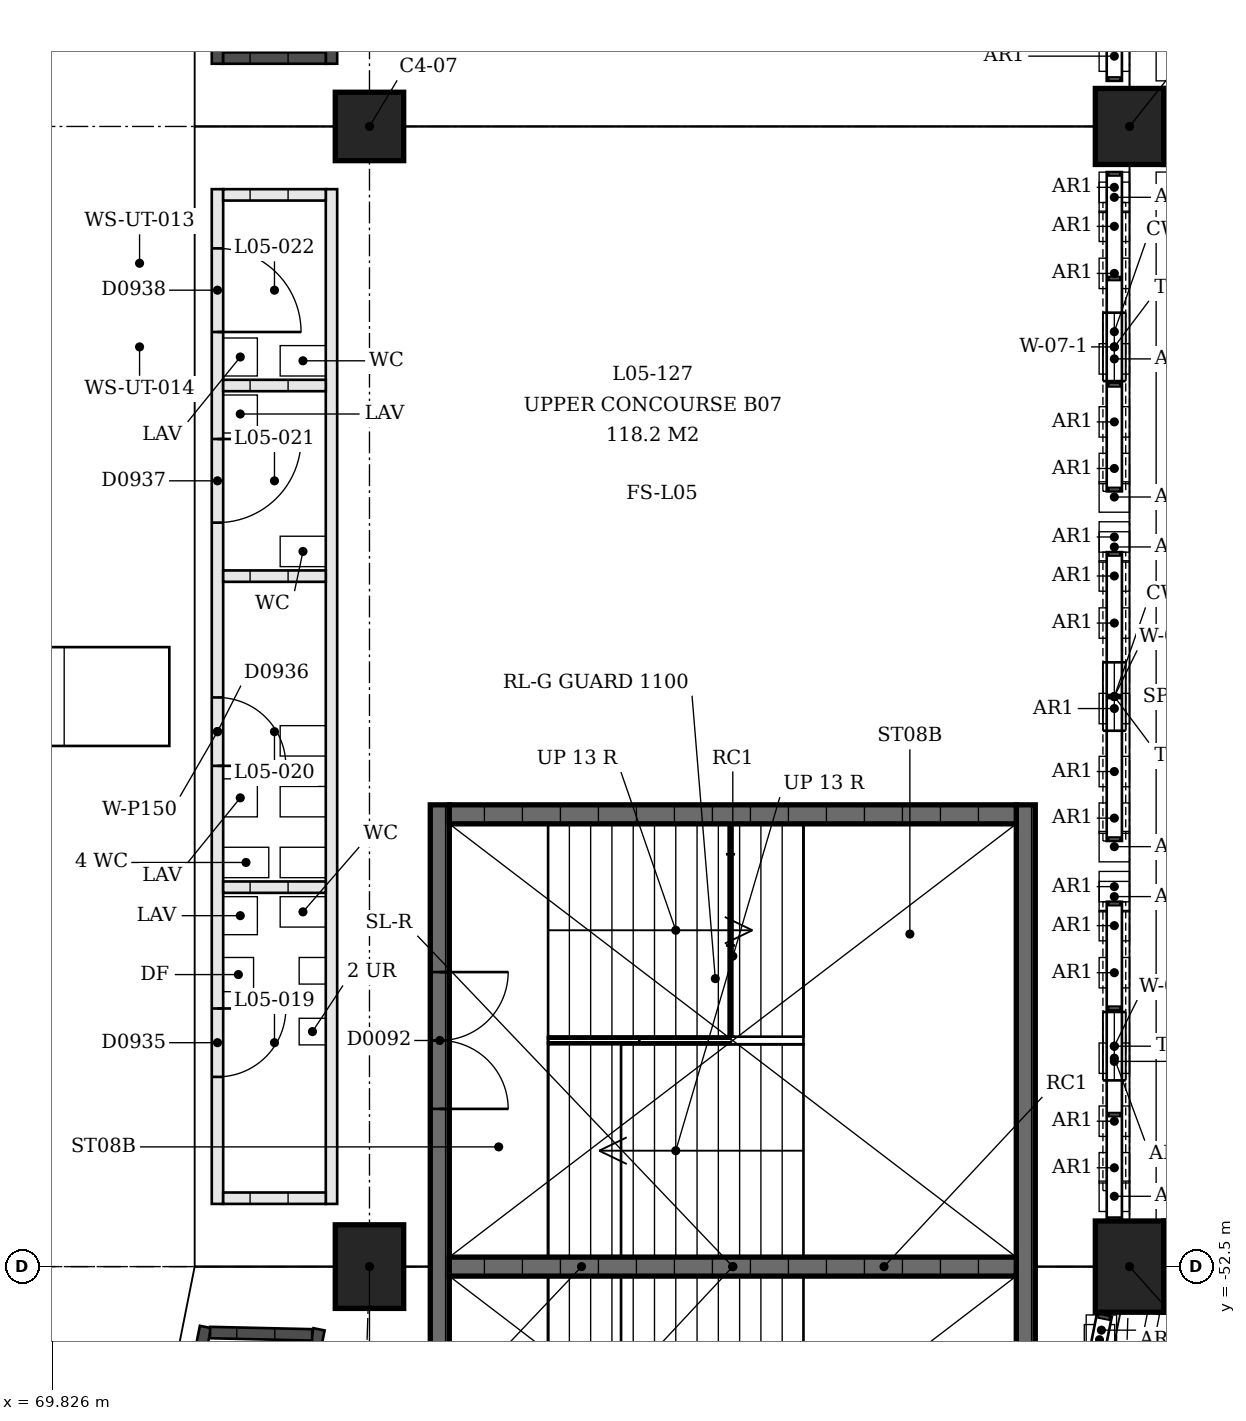
"""IFC4 building model, lengths in metres.
Left out: names, types, materials, properties, quantities, classifications, styles, units other than length and angle.
Written with IfcOpenShell. Run it as: python <this file> out.ifc"""

import sys

from ifc_helpers import new_model, si_unit, direction, frame, frame_2d, origin, origin_2d, place, context, subcontext, project, spatial, polyline, rectangle, outline, extrude, element, fill, save


model = new_model("IFC4")
c1 = context("Model", 3, precision=1e-05, world=origin(), true_north=direction((0.0, 1.0)))
c2 = subcontext(c1, "Body", "Model", "MODEL_VIEW")
j1 = project(units=[si_unit("LENGTHUNIT", "METRE"), si_unit("PLANEANGLEUNIT", "RADIAN")], contexts=[c1])
p1 = place(None, origin())
s1 = spatial("IfcSite", under=j1, at=p1, CompositionType="ELEMENT")
p2 = place(p1, origin())
s2 = spatial("IfcBuilding", under=s1, at=p2, CompositionType="ELEMENT")
p3 = place(p2, frame((0.0, 0.0, 22.5)))
s3 = spatial("IfcBuildingStorey", under=s2, at=p3, CompositionType="ELEMENT", Elevation=22.5)
p4 = place(p3, frame((74.0, -37.5, 0.0), z_axis=(0.0, 0.0, 1.0), x_axis=(0.0, 1.0, 0.0)))
e1 = element("IfcColumn", 1, at=p4, inside=s3, PredefinedType="COLUMN", context=c2, shape_type="SweptSolid", body=[
    extrude(rectangle(XDim=0.9, YDim=0.9, at=origin_2d()), origin(), (0.0, 0.0, 1.0), 6.5),
])
p5 = place(p3, frame((84.0, -37.5, 0.0), z_axis=(0.0, 0.0, 1.0), x_axis=(0.0, 1.0, 0.0)))
e2 = element("IfcColumn", 2, at=p5, inside=s3, PredefinedType="COLUMN", context=c2, shape_type="SweptSolid", body=[
    extrude(rectangle(XDim=1.0, YDim=0.9, at=origin_2d()), origin(), (0.0, 0.0, 1.0), 6.5),
])
p6 = place(p3, frame((74.0, -52.5, 0.0), z_axis=(0.0, 0.0, 1.0), x_axis=(0.0, 1.0, 0.0)))
e3 = element("IfcColumn", 3, at=p6, inside=s3, PredefinedType="COLUMN", context=c2, shape_type="SweptSolid", body=[
    extrude(rectangle(XDim=1.1, YDim=0.9, at=origin_2d()), origin(), (0.0, 0.0, 1.0), 6.5),
])
p7 = place(p3, frame((84.0, -52.5, 0.0), z_axis=(0.0, 0.0, 1.0), x_axis=(0.0, 1.0, 0.0)))
e4 = element("IfcColumn", 4, at=p7, inside=s3, PredefinedType="COLUMN", context=c2, shape_type="SweptSolid", body=[
    extrude(rectangle(XDim=1.2, YDim=0.9, at=origin_2d()), origin(), (0.0, 0.0, 1.0), 6.5),
])
p8 = place(p3, frame((83.8, -38.5, 4.1), z_axis=(0.0, 0.0, 1.0), x_axis=(0.0, -1.0, 0.0)))
e5 = element("IfcWall", 5, at=p8, inside=s3, PredefinedType="SOLIDWALL", context=c2, shape_type="SweptSolid", body=[
    extrude(outline(polyline([(0.0, 0.0), (3.8, 0.0), (3.8, 0.05), (3.676, 1.314), (3.308, 2.581), (2.709, 3.757), (1.9, 4.8), (1.091, 3.757), (0.492, 2.581), (0.124, 1.314), (0.0, 0.05), (0.0, 0.0)])), frame((0.0, 0.15, 0.0), z_axis=(0.0, -1.0, 0.0), x_axis=(1.0, 0.0, 0.0)), (0.0, 0.0, 1.0), 0.3),
])
p9 = place(p8, frame((1.45, 0.0, 0.4)))
e6 = element("IfcOpeningElement", 6, at=p9, cuts=e5, PredefinedType="OPENING", context=c2, shape_type="SweptSolid", body=[
    extrude(rectangle(XDim=0.9, YDim=3.6, at=frame_2d((0.45, 1.8))), frame((0.0, 0.16, 0.0), z_axis=(0.0, -1.0, 0.0), x_axis=(1.0, 0.0, 0.0)), (0.0, 0.0, 1.0), 0.32),
])
p10 = place(p3, frame((83.8, -43.1, 4.1), z_axis=(0.0, 0.0, 1.0), x_axis=(0.0, -1.0, 0.0)))
e7 = element("IfcWall", 7, at=p10, inside=s3, PredefinedType="SOLIDWALL", context=c2, shape_type="SweptSolid", body=[
    extrude(outline(polyline([(0.0, 0.0), (3.8, 0.0), (3.8, 0.05), (3.676, 1.314), (3.308, 2.581), (2.709, 3.757), (1.9, 4.8), (1.091, 3.757), (0.492, 2.581), (0.124, 1.314), (0.0, 0.05), (0.0, 0.0)])), frame((0.0, 0.15, 0.0), z_axis=(0.0, -1.0, 0.0), x_axis=(1.0, 0.0, 0.0)), (0.0, 0.0, 1.0), 0.3),
])
p11 = place(p10, frame((1.45, 0.0, 0.4)))
e8 = element("IfcOpeningElement", 8, at=p11, cuts=e7, PredefinedType="OPENING", context=c2, shape_type="SweptSolid", body=[
    extrude(rectangle(XDim=0.9, YDim=3.6, at=frame_2d((0.45, 1.8))), frame((0.0, 0.16, 0.0), z_axis=(0.0, -1.0, 0.0), x_axis=(1.0, 0.0, 0.0)), (0.0, 0.0, 1.0), 0.32),
])
p12 = place(p3, frame((83.8, -47.7, 4.1), z_axis=(0.0, 0.0, 1.0), x_axis=(0.0, -1.0, 0.0)))
e9 = element("IfcWall", 9, at=p12, inside=s3, PredefinedType="SOLIDWALL", context=c2, shape_type="SweptSolid", body=[
    extrude(outline(polyline([(0.0, 0.0), (3.8, 0.0), (3.8, 0.05), (3.676, 1.314), (3.308, 2.581), (2.709, 3.757), (1.9, 4.8), (1.091, 3.757), (0.492, 2.581), (0.124, 1.314), (0.0, 0.05), (0.0, 0.0)])), frame((0.0, 0.15, 0.0), z_axis=(0.0, -1.0, 0.0), x_axis=(1.0, 0.0, 0.0)), (0.0, 0.0, 1.0), 0.3),
])
p13 = place(p12, frame((1.45, 0.0, 0.4)))
e10 = element("IfcOpeningElement", 10, at=p13, cuts=e9, PredefinedType="OPENING", context=c2, shape_type="SweptSolid", body=[
    extrude(rectangle(XDim=0.9, YDim=3.6, at=frame_2d((0.45, 1.8))), frame((0.0, 0.16, 0.0), z_axis=(0.0, -1.0, 0.0), x_axis=(1.0, 0.0, 0.0)), (0.0, 0.0, 1.0), 0.32),
])
p14 = place(p3, frame((74.925, -58.575, 0.0), z_axis=(0.0, 0.0, 1.0), x_axis=(0.0, 1.0, 0.0)))
e11 = element("IfcWall", 11, at=p14, inside=s3, PredefinedType="SHEAR", context=c2, shape_type="SweptSolid", body=[
    extrude(rectangle(XDim=12.15, YDim=0.25, at=frame_2d((6.075, 0.0))), origin(), (0.0, 0.0, 1.0), 2.1),
])
p15 = place(p14, frame((2.2, 0.0, 0.0)))
e12 = element("IfcOpeningElement", 12, at=p15, cuts=e11, PredefinedType="OPENING", context=c2, shape_type="SweptSolid", body=[
    extrude(rectangle(XDim=1.8, YDim=2.1, at=frame_2d((0.9, 1.05))), frame((0.0, 0.125, 0.0), z_axis=(0.0, -1.0, 0.0), x_axis=(1.0, 0.0, 0.0)), (0.0, 0.0, 1.0), 0.25),
])
p16 = place(p14, frame((8.15, 0.0, 0.0)))
e13 = element("IfcOpeningElement", 13, at=p16, cuts=e11, PredefinedType="OPENING", context=c2, shape_type="SweptSolid", body=[
    extrude(rectangle(XDim=1.8, YDim=2.1, at=frame_2d((0.9, 1.05))), frame((0.0, 0.125, 0.0), z_axis=(0.0, -1.0, 0.0), x_axis=(1.0, 0.0, 0.0)), (0.0, 0.0, 1.0), 0.25),
])
p17 = place(p3, frame((82.635, -58.575, 0.0), z_axis=(0.0, 0.0, 1.0), x_axis=(0.0, 1.0, 0.0)))
e14 = element("IfcWall", 14, at=p17, inside=s3, PredefinedType="SHEAR", context=c2, shape_type="SweptSolid", body=[
    extrude(rectangle(XDim=12.15, YDim=0.25, at=frame_2d((6.075, 0.0))), origin(), (0.0, 0.0, 1.0), 2.1),
])
for number, where, z_axis, x_axis in (
    (15, (75.05, -46.55, 0.0), (0.0, 0.0, 1.0), (1.0, 0.0, 0.0)),
    (16, (75.05, -52.5, 0.0), (0.0, 0.0, 1.0), (1.0, 0.0, 0.0)),
):
    element("IfcWall", number, at=place(p3, frame(where, z_axis=z_axis, x_axis=x_axis)), inside=s3, PredefinedType="SHEAR", context=c2, shape_type="SweptSolid", body=[
        extrude(rectangle(XDim=7.46, YDim=0.25, at=frame_2d((3.73, 0.0))), origin(), (0.0, 0.0, 1.0), 2.1),
    ])
p18 = place(p3, frame((72.0, -23.325, 0.0), z_axis=(0.0, 0.0, 1.0), x_axis=(0.0, -1.0, 0.0)))
e17 = element("IfcWall", 17, at=p18, inside=s3, PredefinedType="SOLIDWALL", context=c2, shape_type="SweptSolid", body=[
    extrude(rectangle(XDim=13.35, YDim=0.15, at=frame_2d((6.675, 0.0))), origin(), (0.0, 0.0, 1.0), 3.0),
])
p19 = place(p18, frame((2.875, 0.0, 0.0)))
e18 = element("IfcOpeningElement", 18, at=p19, cuts=e17, PredefinedType="OPENING", context=c2, shape_type="SweptSolid", body=[
    extrude(rectangle(XDim=1.0, YDim=2.1, at=frame_2d((0.5, 1.05))), frame((0.0, 0.075, 0.0), z_axis=(0.0, -1.0, 0.0), x_axis=(1.0, 0.0, 0.0)), (0.0, 0.0, 1.0), 0.15),
])
p20 = place(p18, frame((9.475, 0.0, 0.0)))
e19 = element("IfcOpeningElement", 19, at=p20, cuts=e17, PredefinedType="OPENING", context=c2, shape_type="SweptSolid", body=[
    extrude(rectangle(XDim=1.0, YDim=2.1, at=frame_2d((0.5, 1.05))), frame((0.0, 0.075, 0.0), z_axis=(0.0, -1.0, 0.0), x_axis=(1.0, 0.0, 0.0)), (0.0, 0.0, 1.0), 0.15),
])
p21 = place(p3, frame((73.5, -23.325, 0.0), z_axis=(0.0, 0.0, 1.0), x_axis=(0.0, -1.0, 0.0)))
e20 = element("IfcWall", 20, at=p21, inside=s3, PredefinedType="SOLIDWALL", context=c2, shape_type="SweptSolid", body=[
    extrude(rectangle(XDim=13.35, YDim=0.15, at=frame_2d((6.675, 0.0))), origin(), (0.0, 0.0, 1.0), 3.0),
])
p22 = place(p3, frame((72.075, -36.6, 0.0), z_axis=(0.0, 0.0, 1.0), x_axis=(1.0, 0.0, 0.0)))
e21 = element("IfcWall", 21, at=p22, inside=s3, PredefinedType="SOLIDWALL", context=c2, shape_type="SweptSolid", body=[
    extrude(rectangle(XDim=1.35, YDim=0.15, at=frame_2d((0.675, 0.0))), origin(), (0.0, 0.0, 1.0), 3.0),
])
p23 = place(p3, frame((72.0, -51.675, 0.0), z_axis=(0.0, 0.0, 1.0), x_axis=(0.0, 1.0, 0.0)))
e22 = element("IfcWall", 22, at=p23, inside=s3, PredefinedType="PARTITIONING", context=c2, shape_type="SweptSolid", body=[
    extrude(rectangle(XDim=13.35, YDim=0.15, at=frame_2d((6.675, 0.0))), origin(), (0.0, 0.0, 1.0), 3.0),
])
p24 = place(p23, frame((1.671, 0.0, 0.0)))
e23 = element("IfcOpeningElement", 23, at=p24, cuts=e22, PredefinedType="OPENING", context=c2, shape_type="SweptSolid", body=[
    extrude(rectangle(XDim=0.9, YDim=2.1, at=frame_2d((0.45, 1.05))), frame((0.0, 0.075, 0.0), z_axis=(0.0, -1.0, 0.0), x_axis=(1.0, 0.0, 0.0)), (0.0, 0.0, 1.0), 0.15),
])
p25 = place(p23, frame((5.763, 0.0, 0.0)))
e24 = element("IfcOpeningElement", 24, at=p25, cuts=e22, PredefinedType="OPENING", context=c2, shape_type="SweptSolid", body=[
    extrude(rectangle(XDim=0.9, YDim=2.1, at=frame_2d((0.45, 1.05))), frame((0.0, 0.075, 0.0), z_axis=(0.0, -1.0, 0.0), x_axis=(1.0, 0.0, 0.0)), (0.0, 0.0, 1.0), 0.15),
])
p26 = place(p23, frame((8.963, 0.0, 0.0)))
e25 = element("IfcOpeningElement", 25, at=p26, cuts=e22, PredefinedType="OPENING", context=c2, shape_type="SweptSolid", body=[
    extrude(rectangle(XDim=1.1, YDim=2.1, at=frame_2d((0.55, 1.05))), frame((0.0, 0.075, 0.0), z_axis=(0.0, -1.0, 0.0), x_axis=(1.0, 0.0, 0.0)), (0.0, 0.0, 1.0), 0.15),
])
p27 = place(p23, frame((11.471, 0.0, 0.0)))
e26 = element("IfcOpeningElement", 26, at=p27, cuts=e22, PredefinedType="OPENING", context=c2, shape_type="SweptSolid", body=[
    extrude(rectangle(XDim=1.1, YDim=2.1, at=frame_2d((0.55, 1.05))), frame((0.0, 0.075, 0.0), z_axis=(0.0, -1.0, 0.0), x_axis=(1.0, 0.0, 0.0)), (0.0, 0.0, 1.0), 0.15),
])
p28 = place(p3, frame((73.5, -51.675, 0.0), z_axis=(0.0, 0.0, 1.0), x_axis=(0.0, 1.0, 0.0)))
e27 = element("IfcWall", 27, at=p28, inside=s3, PredefinedType="PARTITIONING", context=c2, shape_type="SweptSolid", body=[
    extrude(rectangle(XDim=13.35, YDim=0.15, at=frame_2d((6.675, 0.0))), origin(), (0.0, 0.0, 1.0), 3.0),
])
for number, where, z_axis, x_axis in (
    (28, (72.075, -51.6, 0.0), (0.0, 0.0, 1.0), (1.0, 0.0, 0.0)),
    (29, (72.075, -47.508, 0.0), (0.0, 0.0, 1.0), (1.0, 0.0, 0.0)),
    (30, (72.075, -43.416, 0.0), (0.0, 0.0, 1.0), (1.0, 0.0, 0.0)),
    (31, (72.075, -40.908, 0.0), (0.0, 0.0, 1.0), (1.0, 0.0, 0.0)),
    (32, (72.075, -38.4, 0.0), (0.0, 0.0, 1.0), (1.0, 0.0, 0.0)),
):
    element("IfcWall", number, at=place(p3, frame(where, z_axis=z_axis, x_axis=x_axis)), inside=s3, PredefinedType="PARTITIONING", context=c2, shape_type="SweptSolid", body=[
        extrude(rectangle(XDim=1.35, YDim=0.15, at=frame_2d((0.675, 0.0))), origin(), (0.0, 0.0, 1.0), 3.0),
    ])
p29 = place(p3, frame((71.842, -53.293, 0.0), z_axis=(0.0, 0.0, 1.0), x_axis=(-0.195095631841, -0.980784224198, 0.0)))
e33 = element("IfcWall", 33, at=p29, inside=s3, PredefinedType="SOLIDWALL", context=c2, shape_type="SweptSolid", body=[
    extrude(rectangle(XDim=13.113, YDim=0.15, at=frame_2d((6.557, 0.0))), origin(), (0.0, 0.0, 1.0), 3.0),
])
p30 = place(p29, frame((2.815, 0.0, 0.0)))
e34 = element("IfcOpeningElement", 34, at=p30, cuts=e33, PredefinedType="OPENING", context=c2, shape_type="SweptSolid", body=[
    extrude(rectangle(XDim=1.0, YDim=2.1, at=frame_2d((0.5, 1.05))), frame((0.0, 0.075, 0.0), z_axis=(0.0, -1.0, 0.0), x_axis=(1.0, 0.0, 0.0)), (0.0, 0.0, 1.0), 0.15),
])
p31 = place(p29, frame((9.298, 0.0, 0.0)))
e35 = element("IfcOpeningElement", 35, at=p31, cuts=e33, PredefinedType="OPENING", context=c2, shape_type="SweptSolid", body=[
    extrude(rectangle(XDim=1.0, YDim=2.1, at=frame_2d((0.5, 1.05))), frame((0.0, 0.075, 0.0), z_axis=(0.0, -1.0, 0.0), x_axis=(1.0, 0.0, 0.0)), (0.0, 0.0, 1.0), 0.15),
])
p32 = place(p3, frame((73.336, -53.325, 0.0), z_axis=(0.0, 0.0, 1.0), x_axis=(-0.195086146928, -0.980786110871, 0.0)))
e36 = element("IfcWall", 36, at=p32, inside=s3, PredefinedType="SOLIDWALL", context=c2, shape_type="SweptSolid", body=[
    extrude(rectangle(XDim=13.631, YDim=0.15, at=frame_2d((6.815, 0.0))), origin(), (0.0, 0.0, 1.0), 3.0),
])
p33 = place(p3, frame((71.903, -53.367, 0.0), z_axis=(0.0, 0.0, 1.0), x_axis=(0.999738070999, -0.022886445666, 0.0)))
e37 = element("IfcWall", 37, at=p33, inside=s3, PredefinedType="SOLIDWALL", context=c2, shape_type="SweptSolid", body=[
    extrude(rectangle(XDim=1.344, YDim=0.15, at=frame_2d((0.672, 0.0))), origin(), (0.0, 0.0, 1.0), 3.0),
])
p34 = place(p9, origin())
e38 = element("IfcWindow", 38, at=p34, inside=s3, PartitioningType="SINGLE_PANEL", PredefinedType="WINDOW", context=c2, shape_type="SweptSolid", body=[
    extrude(rectangle(XDim=0.9, YDim=3.6, at=frame_2d((0.45, 1.8))), frame((0.0, 0.03, 0.0), z_axis=(0.0, -1.0, 0.0), x_axis=(1.0, 0.0, 0.0)), (0.0, 0.0, 1.0), 0.06),
])
fill(e6, e38)
p35 = place(p11, origin())
e39 = element("IfcWindow", 39, at=p35, inside=s3, PartitioningType="SINGLE_PANEL", PredefinedType="WINDOW", context=c2, shape_type="SweptSolid", body=[
    extrude(rectangle(XDim=0.9, YDim=3.6, at=frame_2d((0.45, 1.8))), frame((0.0, 0.03, 0.0), z_axis=(0.0, -1.0, 0.0), x_axis=(1.0, 0.0, 0.0)), (0.0, 0.0, 1.0), 0.06),
])
fill(e8, e39)
p36 = place(p13, origin())
e40 = element("IfcWindow", 40, at=p36, inside=s3, PartitioningType="SINGLE_PANEL", PredefinedType="WINDOW", context=c2, shape_type="SweptSolid", body=[
    extrude(rectangle(XDim=0.9, YDim=3.6, at=frame_2d((0.45, 1.8))), frame((0.0, 0.03, 0.0), z_axis=(0.0, -1.0, 0.0), x_axis=(1.0, 0.0, 0.0)), (0.0, 0.0, 1.0), 0.06),
])
fill(e10, e40)
p37 = place(p16, origin())
e41 = element("IfcDoor", 41, at=p37, inside=s3, OperationType="DOUBLE_DOOR_SINGLE_SWING", PredefinedType="DOOR", context=c2, shape_type="SweptSolid", body=[
    extrude(rectangle(XDim=1.8, YDim=2.1, at=frame_2d((0.9, 1.05))), frame((0.0, 0.025, 0.0), z_axis=(0.0, -1.0, 0.0), x_axis=(1.0, 0.0, 0.0)), (0.0, 0.0, 1.0), 0.05),
])
fill(e13, e41)
p38 = place(p24, origin())
e42 = element("IfcDoor", 42, at=p38, inside=s3, OperationType="SINGLE_SWING_RIGHT", PredefinedType="DOOR", context=c2, shape_type="SweptSolid", body=[
    extrude(rectangle(XDim=0.9, YDim=2.1, at=frame_2d((0.45, 1.05))), frame((0.0, 0.025, 0.0), z_axis=(0.0, -1.0, 0.0), x_axis=(1.0, 0.0, 0.0)), (0.0, 0.0, 1.0), 0.05),
])
fill(e23, e42)
p39 = place(p25, origin())
e43 = element("IfcDoor", 43, at=p39, inside=s3, OperationType="SINGLE_SWING_LEFT", PredefinedType="DOOR", context=c2, shape_type="SweptSolid", body=[
    extrude(rectangle(XDim=0.9, YDim=2.1, at=frame_2d((0.45, 1.05))), frame((0.0, 0.025, 0.0), z_axis=(0.0, -1.0, 0.0), x_axis=(1.0, 0.0, 0.0)), (0.0, 0.0, 1.0), 0.05),
])
fill(e24, e43)
p40 = place(p26, origin())
e44 = element("IfcDoor", 44, at=p40, inside=s3, OperationType="SINGLE_SWING_RIGHT", PredefinedType="DOOR", context=c2, shape_type="SweptSolid", body=[
    extrude(rectangle(XDim=1.1, YDim=2.1, at=frame_2d((0.55, 1.05))), frame((0.0, 0.025, 0.0), z_axis=(0.0, -1.0, 0.0), x_axis=(1.0, 0.0, 0.0)), (0.0, 0.0, 1.0), 0.05),
])
fill(e25, e44)
p41 = place(p27, origin())
e45 = element("IfcDoor", 45, at=p41, inside=s3, OperationType="SINGLE_SWING_LEFT", PredefinedType="DOOR", context=c2, shape_type="SweptSolid", body=[
    extrude(rectangle(XDim=1.1, YDim=2.1, at=frame_2d((0.55, 1.05))), frame((0.0, 0.025, 0.0), z_axis=(0.0, -1.0, 0.0), x_axis=(1.0, 0.0, 0.0)), (0.0, 0.0, 1.0), 0.05),
])
fill(e26, e45)
save(model, sys.argv[1])
